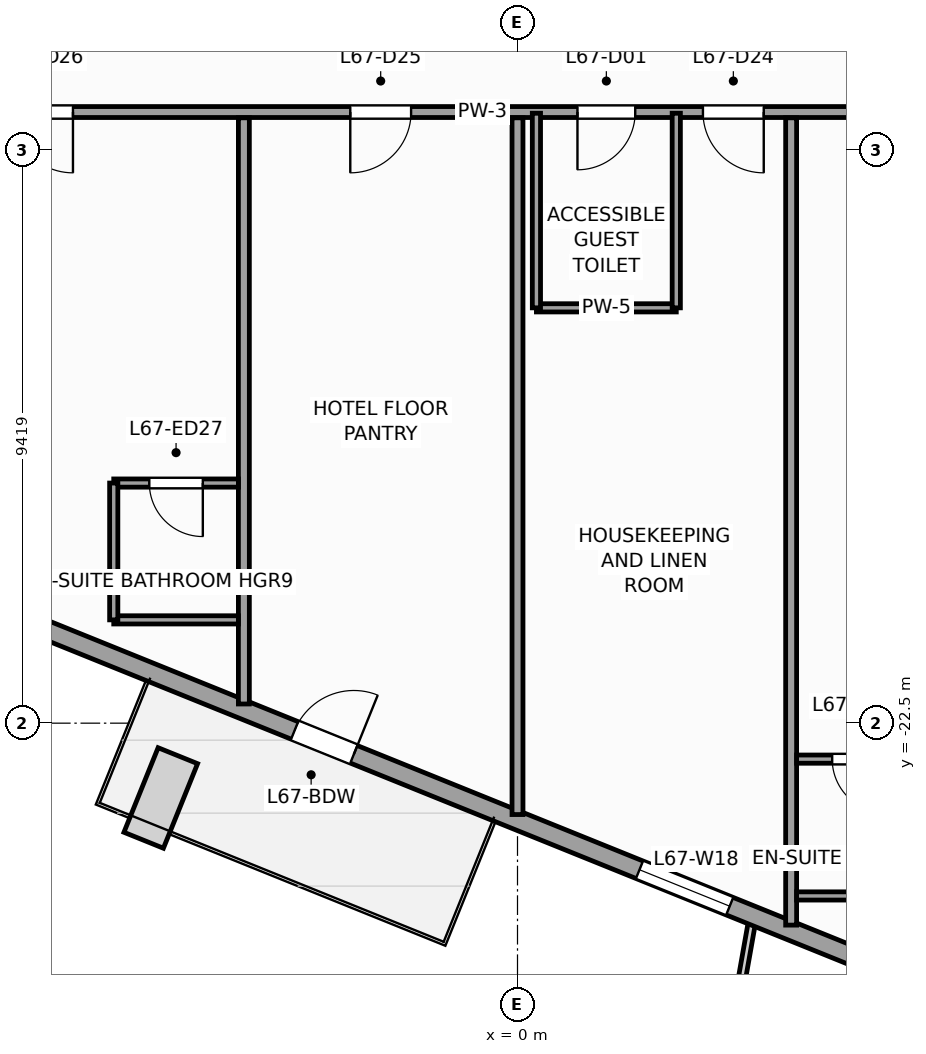
"""IFC4 building model, lengths in metres.
Left out: names, types, materials, properties, quantities, classifications, styles, units other than length and angle.
Written with IfcOpenShell. Run it as: python <this file> out.ifc"""

import sys

from ifc_helpers import new_model, si_unit, direction, frame, frame_2d, origin, place, context, subcontext, project, spatial, rectangle, extrude, source, transform, mapped, element, fill, save


model = new_model("IFC4")
c1 = context("Model", 3, precision=1e-05, world=origin(), true_north=direction((0.0, 1.0)))
c2 = subcontext(c1, "Body", "Model", "MODEL_VIEW")
j1 = project(units=[si_unit("LENGTHUNIT", "METRE"), si_unit("PLANEANGLEUNIT", "RADIAN")], contexts=[c1])
p1 = place(None, origin())
s1 = spatial("IfcSite", under=j1, at=p1, CompositionType="ELEMENT")
p2 = place(p1, origin())
s2 = spatial("IfcBuilding", under=s1, at=p2, CompositionType="ELEMENT")
p3 = place(p2, frame((0.0, 0.0, 276.0)))
s3 = spatial("IfcBuildingStorey", under=s2, at=p3, CompositionType="ELEMENT", Elevation=276.0)
p4 = place(p3, frame((-23.813, -14.479, 0.0), z_axis=(0.0, 0.0, 1.0), x_axis=(0.927182657188, -0.374609557019, 0.0)))
e1 = element("IfcWall", 1, at=p4, inside=s3, PredefinedType="STANDARD", context=c2, shape_type="SweptSolid", body=[
    extrude(rectangle(XDim=33.31, YDim=0.31, at=frame_2d((16.655, 0.0))), origin(), (0.0, 0.0, 1.0), 2.75),
])
p5 = place(p4, frame((21.73, 0.0, 0.0)))
e2 = element("IfcOpeningElement", 2, at=p5, cuts=e1, PredefinedType="OPENING", context=c2, shape_type="SweptSolid", body=[
    extrude(rectangle(XDim=1.05, YDim=2.25, at=frame_2d((0.525, 1.125))), frame((0.0, 0.165, 0.0), z_axis=(0.0, -1.0, 0.0), x_axis=(1.0, 0.0, 0.0)), (0.0, 0.0, 1.0), 0.33),
])
p6 = place(p4, frame((3.197, 0.0, 0.47)))
e3 = element("IfcOpeningElement", 3, at=p6, cuts=e1, PredefinedType="OPENING", context=c2, shape_type="SweptSolid", body=[
    extrude(rectangle(XDim=1.6, YDim=2.1, at=frame_2d((0.8, 1.05))), frame((0.0, 0.165, 0.0), z_axis=(0.0, -1.0, 0.0), x_axis=(1.0, 0.0, 0.0)), (0.0, 0.0, 1.0), 0.33),
])
p7 = place(p4, frame((8.86, 0.0, 0.47)))
e4 = element("IfcOpeningElement", 4, at=p7, cuts=e1, PredefinedType="OPENING", context=c2, shape_type="SweptSolid", body=[
    extrude(rectangle(XDim=1.6, YDim=2.1, at=frame_2d((0.8, 1.05))), frame((0.0, 0.165, 0.0), z_axis=(0.0, -1.0, 0.0), x_axis=(1.0, 0.0, 0.0)), (0.0, 0.0, 1.0), 0.33),
])
p8 = place(p4, frame((14.439, 0.0, 0.47)))
e5 = element("IfcOpeningElement", 5, at=p8, cuts=e1, PredefinedType="OPENING", context=c2, shape_type="SweptSolid", body=[
    extrude(rectangle(XDim=1.6, YDim=2.1, at=frame_2d((0.8, 1.05))), frame((0.0, 0.165, 0.0), z_axis=(0.0, -1.0, 0.0), x_axis=(1.0, 0.0, 0.0)), (0.0, 0.0, 1.0), 0.33),
])
p9 = place(p4, frame((27.847, 0.0, 0.47)))
e6 = element("IfcOpeningElement", 6, at=p9, cuts=e1, PredefinedType="OPENING", context=c2, shape_type="SweptSolid", body=[
    extrude(rectangle(XDim=1.6, YDim=2.1, at=frame_2d((0.8, 1.05))), frame((0.0, 0.165, 0.0), z_axis=(0.0, -1.0, 0.0), x_axis=(1.0, 0.0, 0.0)), (0.0, 0.0, 1.0), 0.33),
])
p10 = place(p3, frame((-11.45, -12.45, 0.0), z_axis=(0.0, 0.0, 1.0), x_axis=(1.0, 0.0, 0.0)))
e7 = element("IfcWall", 7, at=p10, inside=s3, PredefinedType="PARTITIONING", context=c2, shape_type="SweptSolid", body=[
    extrude(rectangle(XDim=21.75, YDim=0.18, at=frame_2d((10.875, 0.0))), origin(), (0.0, 0.0, 1.0), 3.35),
])
p11 = place(p10, frame((12.436, 0.0, 0.0)))
e8 = element("IfcOpeningElement", 8, at=p11, cuts=e7, PredefinedType="OPENING", context=c2, shape_type="SweptSolid", body=[
    extrude(rectangle(XDim=0.95, YDim=2.1, at=frame_2d((0.475, 1.05))), frame((0.0, 0.1, 0.0), z_axis=(0.0, -1.0, 0.0), x_axis=(1.0, 0.0, 0.0)), (0.0, 0.0, 1.0), 0.2),
])
p12 = place(p10, frame((18.186, 0.0, 0.0)))
e9 = element("IfcOpeningElement", 9, at=p12, cuts=e7, PredefinedType="OPENING", context=c2, shape_type="SweptSolid", body=[
    extrude(rectangle(XDim=1.0, YDim=2.15, at=frame_2d((0.5, 1.075))), frame((0.0, 0.1, 0.0), z_axis=(0.0, -1.0, 0.0), x_axis=(1.0, 0.0, 0.0)), (0.0, 0.0, 1.0), 0.2),
])
p13 = place(p10, frame((14.5, 0.0, 0.0)))
e10 = element("IfcOpeningElement", 10, at=p13, cuts=e7, PredefinedType="OPENING", context=c2, shape_type="SweptSolid", body=[
    extrude(rectangle(XDim=1.0, YDim=2.15, at=frame_2d((0.5, 1.075))), frame((0.0, 0.1, 0.0), z_axis=(0.0, -1.0, 0.0), x_axis=(1.0, 0.0, 0.0)), (0.0, 0.0, 1.0), 0.2),
])
p14 = place(p10, frame((8.7, 0.0, 0.0)))
e11 = element("IfcOpeningElement", 11, at=p14, cuts=e7, PredefinedType="OPENING", context=c2, shape_type="SweptSolid", body=[
    extrude(rectangle(XDim=1.0, YDim=2.15, at=frame_2d((0.5, 1.075))), frame((0.0, 0.1, 0.0), z_axis=(0.0, -1.0, 0.0), x_axis=(1.0, 0.0, 0.0)), (0.0, 0.0, 1.0), 0.2),
])
p15 = place(p10, frame((3.139, 0.0, 0.0)))
e12 = element("IfcOpeningElement", 12, at=p15, cuts=e7, PredefinedType="OPENING", context=c2, shape_type="SweptSolid", body=[
    extrude(rectangle(XDim=1.0, YDim=2.15, at=frame_2d((0.5, 1.075))), frame((0.0, 0.1, 0.0), z_axis=(0.0, -1.0, 0.0), x_axis=(1.0, 0.0, 0.0)), (0.0, 0.0, 1.0), 0.2),
])
p16 = place(p3, frame((4.5, -12.545, 0.0), z_axis=(0.0, 0.0, 1.0), x_axis=(0.0, -1.0, 0.0)))
e13 = element("IfcWall", 13, at=p16, inside=s3, PredefinedType="PARTITIONING", context=c2, shape_type="SweptSolid", body=[
    extrude(rectangle(XDim=13.276, YDim=0.18, at=frame_2d((6.638, 0.0))), origin(), (0.0, 0.0, 1.0), 3.35),
])
p17 = place(p3, frame((0.0, -12.545, 0.0), z_axis=(0.0, 0.0, 1.0), x_axis=(0.0, -1.0, 0.0)))
e14 = element("IfcWall", 14, at=p17, inside=s3, PredefinedType="PARTITIONING", context=c2, shape_type="SweptSolid", body=[
    extrude(rectangle(XDim=11.458, YDim=0.18, at=frame_2d((5.729, 0.0))), origin(), (0.0, 0.0, 1.0), 3.35),
])
p18 = place(p3, frame((-4.5, -12.545, 0.0), z_axis=(0.0, 0.0, 1.0), x_axis=(0.0, -1.0, 0.0)))
e15 = element("IfcWall", 15, at=p18, inside=s3, PredefinedType="PARTITIONING", context=c2, shape_type="SweptSolid", body=[
    extrude(rectangle(XDim=9.64, YDim=0.18, at=frame_2d((4.82, 0.0))), origin(), (0.0, 0.0, 1.0), 3.35),
])
p19 = place(p3, frame((0.311, -15.67, 0.0), z_axis=(0.0, 0.0, 1.0), x_axis=(1.0, 0.0, 0.0)))
e16 = element("IfcWall", 16, at=p19, inside=s3, PredefinedType="PARTITIONING", context=c2, shape_type="SweptSolid", body=[
    extrude(rectangle(XDim=2.3, YDim=0.135, at=frame_2d((1.15, 0.0))), origin(), (0.0, 0.0, 1.0), 3.35),
])
for number, where, z_axis, x_axis in (
    (17, (2.611, -15.67, 0.0), (0.0, 0.0, 1.0), (0.0, 1.0, 0.0)),
    (18, (0.311, -15.67, 0.0), (0.0, 0.0, 1.0), (0.0, 1.0, 0.0)),
):
    element("IfcWall", number, at=place(p3, frame(where, z_axis=z_axis, x_axis=x_axis)), inside=s3, PredefinedType="PARTITIONING", context=c2, shape_type="SweptSolid", body=[
        extrude(rectangle(XDim=3.2, YDim=0.135, at=frame_2d((1.6, 0.0))), origin(), (0.0, 0.0, 1.0), 3.35),
    ])
p20 = place(p3, frame((4.59, -25.342, 0.0), z_axis=(0.0, 0.0, 1.0), x_axis=(1.0, 0.0, 0.0)))
e19 = element("IfcWall", 19, at=p20, inside=s3, PredefinedType="PARTITIONING", context=c2, shape_type="SweptSolid", body=[
    extrude(rectangle(XDim=2.05, YDim=0.135, at=frame_2d((1.025, 0.0))), origin(), (0.0, 0.0, 1.0), 3.35),
])
p21 = place(p3, frame((4.59, -23.092, 0.0), z_axis=(0.0, 0.0, 1.0), x_axis=(1.0, 0.0, 0.0)))
e20 = element("IfcWall", 20, at=p21, inside=s3, PredefinedType="PARTITIONING", context=c2, shape_type="SweptSolid", body=[
    extrude(rectangle(XDim=2.05, YDim=0.135, at=frame_2d((1.025, 0.0))), origin(), (0.0, 0.0, 1.0), 3.35),
])
p22 = place(p21, frame((0.585, 0.0, 0.0)))
e21 = element("IfcOpeningElement", 21, at=p22, cuts=e20, PredefinedType="OPENING", context=c2, shape_type="SweptSolid", body=[
    extrude(rectangle(XDim=0.88, YDim=2.1, at=frame_2d((0.44, 1.05))), frame((0.0, 0.078, 0.0), z_axis=(0.0, -1.0, 0.0), x_axis=(1.0, 0.0, 0.0)), (0.0, 0.0, 1.0), 0.155),
])
p23 = place(p3, frame((-6.64, -20.801, 0.0), z_axis=(0.0, 0.0, 1.0), x_axis=(1.0, 0.0, 0.0)))
e22 = element("IfcWall", 22, at=p23, inside=s3, PredefinedType="PARTITIONING", context=c2, shape_type="SweptSolid", body=[
    extrude(rectangle(XDim=2.05, YDim=0.135, at=frame_2d((1.025, 0.0))), origin(), (0.0, 0.0, 1.0), 3.35),
])
p24 = place(p3, frame((-6.64, -18.551, 0.0), z_axis=(0.0, 0.0, 1.0), x_axis=(1.0, 0.0, 0.0)))
e23 = element("IfcWall", 23, at=p24, inside=s3, PredefinedType="PARTITIONING", context=c2, shape_type="SweptSolid", body=[
    extrude(rectangle(XDim=2.05, YDim=0.135, at=frame_2d((1.025, 0.0))), origin(), (0.0, 0.0, 1.0), 2.95),
])
p25 = place(p24, frame((0.585, 0.0, 0.0)))
e24 = element("IfcOpeningElement", 24, at=p25, cuts=e23, PredefinedType="OPENING", context=c2, shape_type="SweptSolid", body=[
    extrude(rectangle(XDim=0.88, YDim=2.1, at=frame_2d((0.44, 1.05))), frame((0.0, 0.078, 0.0), z_axis=(0.0, -1.0, 0.0), x_axis=(1.0, 0.0, 0.0)), (0.0, 0.0, 1.0), 0.155),
])
p26 = place(p3, frame((-6.64, -20.801, 0.0), z_axis=(0.0, 0.0, 1.0), x_axis=(0.0, 1.0, 0.0)))
e25 = element("IfcWall", 25, at=p26, inside=s3, PredefinedType="PARTITIONING", context=c2, shape_type="SweptSolid", body=[
    extrude(rectangle(XDim=2.25, YDim=0.135, at=frame_2d((1.125, 0.0))), origin(), (0.0, 0.0, 1.0), 3.35),
])
m1 = source(origin(), c2, "Body", "SweptSolid", [
    extrude(rectangle(XDim=1.05, YDim=2.25, at=frame_2d((0.525, 1.125))), frame((0.0, 0.025, 0.0), z_axis=(0.0, -1.0, 0.0), x_axis=(1.0, 0.0, 0.0)), (0.0, 0.0, 1.0), 0.05),
])
p27 = place(p5, origin())
e26 = element("IfcDoor", 26, at=p27, inside=s3, OperationType="SINGLE_SWING_RIGHT", PredefinedType="DOOR", context=c2, shape_type="MappedRepresentation", body=[
    mapped(m1, transform((0.0, 0.0, 0.0), scale=1.0)),
])
fill(e2, e26)
m2 = source(origin(), c2, "Body", "SweptSolid", [
    extrude(rectangle(XDim=1.6, YDim=2.1, at=frame_2d((0.8, 1.05))), frame((0.0, 0.03, 0.0), z_axis=(0.0, -1.0, 0.0), x_axis=(1.0, 0.0, 0.0)), (0.0, 0.0, 1.0), 0.06),
])
p28 = place(p9, origin())
e27 = element("IfcWindow", 27, at=p28, inside=s3, PartitioningType="SINGLE_PANEL", PredefinedType="WINDOW", context=c2, shape_type="MappedRepresentation", body=[
    mapped(m2, transform((0.0, 0.0, 0.0), scale=1.0)),
])
fill(e6, e27)
m3 = source(origin(), c2, "Body", "SweptSolid", [
    extrude(rectangle(XDim=0.95, YDim=2.1, at=frame_2d((0.475, 1.05))), frame((0.0, 0.025, 0.0), z_axis=(0.0, -1.0, 0.0), x_axis=(1.0, 0.0, 0.0)), (0.0, 0.0, 1.0), 0.05),
])
p29 = place(p11, frame((0.95, 0.0, 0.0), z_axis=(0.0, 0.0, 1.0), x_axis=(-1.0, 0.0, 0.0)))
e28 = element("IfcDoor", 28, at=p29, inside=s3, OperationType="SINGLE_SWING_LEFT", PredefinedType="DOOR", context=c2, shape_type="MappedRepresentation", body=[
    mapped(m3, transform((0.0, 0.0, 0.0), scale=1.0)),
])
fill(e8, e28)
m4 = source(origin(), c2, "Body", "SweptSolid", [
    extrude(rectangle(XDim=0.88, YDim=2.1, at=frame_2d((0.44, 1.05))), frame((0.0, 0.025, 0.0), z_axis=(0.0, -1.0, 0.0), x_axis=(1.0, 0.0, 0.0)), (0.0, 0.0, 1.0), 0.05),
])
p30 = place(p22, frame((0.88, 0.0, 0.0), z_axis=(0.0, 0.0, 1.0), x_axis=(-1.0, 0.0, 0.0)))
e29 = element("IfcDoor", 29, at=p30, inside=s3, OperationType="SINGLE_SWING_RIGHT", PredefinedType="DOOR", context=c2, shape_type="MappedRepresentation", body=[
    mapped(m4, transform((0.0, 0.0, 0.0), scale=1.0)),
])
fill(e21, e29)
m5 = source(origin(), c2, "Body", "SweptSolid", [
    extrude(rectangle(XDim=1.0, YDim=2.15, at=frame_2d((0.5, 1.075))), frame((0.0, 0.025, 0.0), z_axis=(0.0, -1.0, 0.0), x_axis=(1.0, 0.0, 0.0)), (0.0, 0.0, 1.0), 0.05),
])
p31 = place(p13, frame((1.0, 0.0, 0.0), z_axis=(0.0, 0.0, 1.0), x_axis=(-1.0, 0.0, 0.0)))
e30 = element("IfcDoor", 30, at=p31, inside=s3, OperationType="SINGLE_SWING_RIGHT", PredefinedType="DOOR", context=c2, shape_type="MappedRepresentation", body=[
    mapped(m5, transform((0.0, 0.0, 0.0), scale=1.0)),
])
fill(e10, e30)
p32 = place(p14, frame((1.0, 0.0, 0.0), z_axis=(0.0, 0.0, 1.0), x_axis=(-1.0, 0.0, 0.0)))
e31 = element("IfcDoor", 31, at=p32, inside=s3, OperationType="SINGLE_SWING_LEFT", PredefinedType="DOOR", context=c2, shape_type="MappedRepresentation", body=[
    mapped(m5, transform((0.0, 0.0, 0.0), scale=1.0)),
])
fill(e11, e31)
p33 = place(p15, frame((1.0, 0.0, 0.0), z_axis=(0.0, 0.0, 1.0), x_axis=(-1.0, 0.0, 0.0)))
e32 = element("IfcDoor", 32, at=p33, inside=s3, OperationType="SINGLE_SWING_RIGHT", PredefinedType="DOOR", context=c2, shape_type="MappedRepresentation", body=[
    mapped(m5, transform((0.0, 0.0, 0.0), scale=1.0)),
])
fill(e12, e32)
p34 = place(p25, frame((0.88, 0.0, 0.0), z_axis=(0.0, 0.0, 1.0), x_axis=(-1.0, 0.0, 0.0)))
e33 = element("IfcDoor", 33, at=p34, inside=s3, OperationType="SINGLE_SWING_RIGHT", PredefinedType="DOOR", context=c2, shape_type="MappedRepresentation", body=[
    mapped(m4, transform((0.0, 0.0, 0.0), scale=1.0)),
])
fill(e24, e33)
save(model, sys.argv[1])
